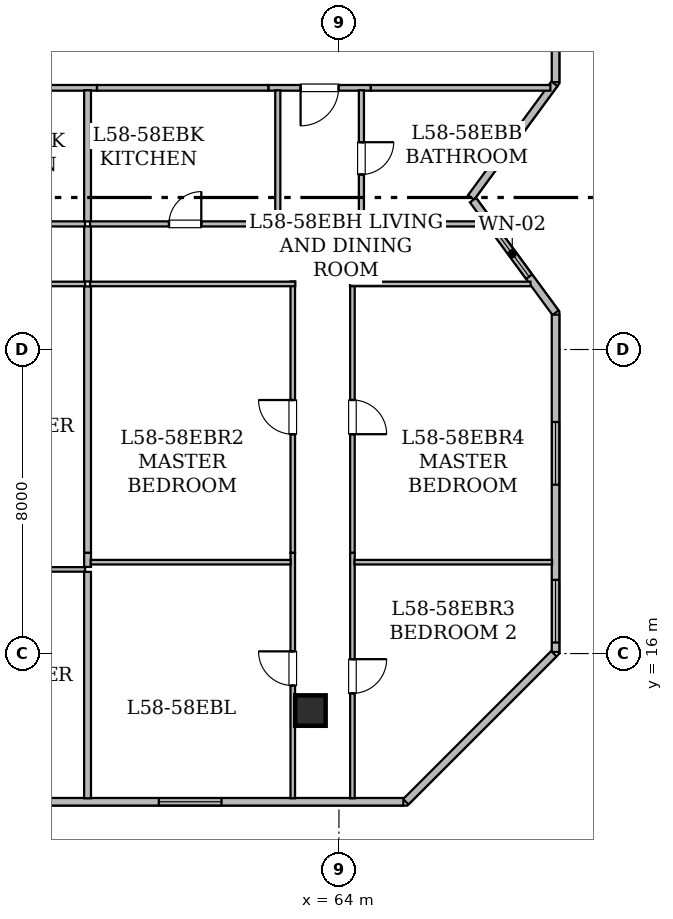
"""IFC4 building model, lengths in metres.
Left out: names, types, materials, properties, quantities, classifications, styles, units other than length and angle.
Written with IfcOpenShell. Run it as: python <this file> out.ifc"""

import sys

from ifc_helpers import new_model, si_unit, direction, frame, frame_2d, origin, origin_2d, place, context, subcontext, project, spatial, rectangle, hollow_rectangle, extrude, element, fill, save


model = new_model("IFC4")
c1 = context("Model", 3, precision=1e-05, world=origin(), true_north=direction((0.0, 1.0)))
c2 = subcontext(c1, "Body", "Model", "MODEL_VIEW")
j1 = project(units=[si_unit("LENGTHUNIT", "METRE"), si_unit("PLANEANGLEUNIT", "RADIAN")], contexts=[c1])
p1 = place(None, origin())
s1 = spatial("IfcSite", under=j1, at=p1, CompositionType="ELEMENT")
p2 = place(p1, origin())
s2 = spatial("IfcBuilding", under=s1, at=p2, CompositionType="ELEMENT")
p3 = place(p2, frame((0.0, 0.0, 228.15)))
s3 = spatial("IfcBuildingStorey", under=s2, at=p3, CompositionType="ELEMENT", Elevation=228.15)
for number, where, z_axis, x_axis in (
    (1, (63.25, 14.5, 0.0), (0.0, 0.0, 1.0), (1.0, 0.0, 0.0)),
    (2, (67.2, 21.425, 0.0), (0.0, 0.0, 1.0), (1.0, 0.0, 0.0)),
):
    element("IfcColumn", number, at=place(p3, frame(where, z_axis=z_axis, x_axis=x_axis)), inside=s3, PredefinedType="COLUMN", context=c2, shape_type="SweptSolid", body=[
        extrude(hollow_rectangle(XDim=0.8, YDim=0.8, WallThickness=0.04, at=origin_2d()), origin(), (0.0, 0.0, 1.0), 3.65),
    ])
p4 = place(p3, frame((69.7, 39.896, 0.0), z_axis=(0.0, 0.0, 1.0), x_axis=(0.0, -1.0, 0.0)))
e3 = element("IfcWall", 3, at=p4, inside=s3, PredefinedType="STANDARD", context=c2, shape_type="SweptSolid", body=[
    extrude(rectangle(XDim=8.863, YDim=0.2, at=frame_2d((4.432, 0.0))), origin(), (0.0, 0.0, 1.0), 3.43),
])
p5 = place(p4, frame((0.785, 0.0, 0.0)))
e4 = element("IfcOpeningElement", 4, at=p5, cuts=e3, PredefinedType="OPENING", context=c2, shape_type="SweptSolid", body=[
    extrude(rectangle(XDim=1.1, YDim=2.2, at=frame_2d((0.55, 1.1))), frame((0.0, 0.11, 0.0), z_axis=(0.0, -1.0, 0.0), x_axis=(1.0, 0.0, 0.0)), (0.0, 0.0, 1.0), 0.22),
])
p6 = place(p4, frame((4.641, 0.0, 0.85)))
e5 = element("IfcOpeningElement", 5, at=p6, cuts=e3, PredefinedType="OPENING", context=c2, shape_type="SweptSolid", body=[
    extrude(rectangle(XDim=1.65, YDim=1.55, at=frame_2d((0.825, 0.775))), frame((0.0, 0.11, 0.0), z_axis=(0.0, -1.0, 0.0), x_axis=(1.0, 0.0, 0.0)), (0.0, 0.0, 1.0), 0.22),
])
p7 = place(p4, frame((2.811, 0.0, 0.8)))
e6 = element("IfcOpeningElement", 6, at=p7, cuts=e3, PredefinedType="OPENING", context=c2, shape_type="SweptSolid", body=[
    extrude(rectangle(XDim=1.2, YDim=1.5, at=frame_2d((0.6, 0.75))), frame((0.0, 0.11, 0.0), z_axis=(0.0, -1.0, 0.0), x_axis=(1.0, 0.0, 0.0)), (0.0, 0.0, 1.0), 0.22),
])
p8 = place(p3, frame((69.67, 30.992, 0.0), z_axis=(0.0, 0.0, 1.0), x_axis=(-0.591320870733, -0.806436375566, 0.0)))
e7 = element("IfcWall", 7, at=p8, inside=s3, PredefinedType="STANDARD", context=c2, shape_type="SweptSolid", body=[
    extrude(rectangle(XDim=3.71, YDim=0.2, at=frame_2d((1.855, 0.0))), origin(), (0.0, 0.0, 1.0), 3.43),
])
p9 = place(p3, frame((67.527, 27.931, 0.0), z_axis=(0.0, 0.0, 1.0), x_axis=(0.591248456881, -0.80648946815, 0.0)))
e8 = element("IfcWall", 8, at=p9, inside=s3, PredefinedType="STANDARD", context=c2, shape_type="SweptSolid", body=[
    extrude(rectangle(XDim=3.675, YDim=0.2, at=frame_2d((1.837, 0.0))), origin(), (0.0, 0.0, 1.0), 3.43),
])
p10 = place(p9, frame((0.998, 0.0, 0.85)))
e9 = element("IfcOpeningElement", 9, at=p10, cuts=e8, PredefinedType="OPENING", context=c2, shape_type="SweptSolid", body=[
    extrude(rectangle(XDim=1.5, YDim=1.6, at=frame_2d((0.75, 0.8))), frame((0.0, 0.11, 0.0), z_axis=(0.0, -1.0, 0.0), x_axis=(1.0, 0.0, 0.0)), (0.0, 0.0, 1.0), 0.22),
])
p11 = place(p3, frame((69.7, 24.916, 0.0), z_axis=(0.0, 0.0, 1.0), x_axis=(0.0, -1.0, 0.0)))
e10 = element("IfcWall", 10, at=p11, inside=s3, PredefinedType="STANDARD", context=c2, shape_type="SweptSolid", body=[
    extrude(rectangle(XDim=8.875, YDim=0.2, at=frame_2d((4.438, 0.0))), origin(), (0.0, 0.0, 1.0), 3.43),
])
p12 = place(p11, frame((6.976, 0.0, 0.85)))
e11 = element("IfcOpeningElement", 11, at=p12, cuts=e10, PredefinedType="OPENING", context=c2, shape_type="SweptSolid", body=[
    extrude(rectangle(XDim=1.65, YDim=1.55, at=frame_2d((0.825, 0.775))), frame((0.0, 0.11, 0.0), z_axis=(0.0, -1.0, 0.0), x_axis=(1.0, 0.0, 0.0)), (0.0, 0.0, 1.0), 0.22),
])
p13 = place(p11, frame((2.823, 0.0, 0.85)))
e12 = element("IfcOpeningElement", 12, at=p13, cuts=e10, PredefinedType="OPENING", context=c2, shape_type="SweptSolid", body=[
    extrude(rectangle(XDim=1.65, YDim=1.55, at=frame_2d((0.825, 0.775))), frame((0.0, 0.11, 0.0), z_axis=(0.0, -1.0, 0.0), x_axis=(1.0, 0.0, 0.0)), (0.0, 0.0, 1.0), 0.22),
])
p14 = place(p3, frame((69.655, 15.996, 0.0), z_axis=(0.0, 0.0, 1.0), x_axis=(-0.707106781187, -0.707106781187, 0.0)))
e13 = element("IfcWall", 13, at=p14, inside=s3, PredefinedType="STANDARD", context=c2, shape_type="SweptSolid", body=[
    extrude(rectangle(XDim=5.51, YDim=0.2, at=frame_2d((2.755, 0.0))), origin(), (0.0, 0.0, 1.0), 3.43),
])
p15 = place(p3, frame((65.696, 12.1, 0.0), z_axis=(0.0, 0.0, 1.0), x_axis=(-1.0, 0.0, 0.0)))
e14 = element("IfcWall", 14, at=p15, inside=s3, PredefinedType="STANDARD", context=c2, shape_type="SweptSolid", body=[
    extrude(rectangle(XDim=41.393, YDim=0.2, at=frame_2d((20.697, 0.0))), origin(), (0.0, 0.0, 1.0), 3.43),
])
p16 = place(p15, frame((34.521, 0.0, 0.85)))
e15 = element("IfcOpeningElement", 15, at=p16, cuts=e14, PredefinedType="OPENING", context=c2, shape_type="SweptSolid", body=[
    extrude(rectangle(XDim=1.65, YDim=1.55, at=frame_2d((0.825, 0.775))), frame((0.0, 0.11, 0.0), z_axis=(0.0, -1.0, 0.0), x_axis=(1.0, 0.0, 0.0)), (0.0, 0.0, 1.0), 0.22),
])
p17 = place(p15, frame((39.14, 0.0, 0.85)))
e16 = element("IfcOpeningElement", 16, at=p17, cuts=e14, PredefinedType="OPENING", context=c2, shape_type="SweptSolid", body=[
    extrude(rectangle(XDim=1.65, YDim=1.55, at=frame_2d((0.825, 0.775))), frame((0.0, 0.11, 0.0), z_axis=(0.0, -1.0, 0.0), x_axis=(1.0, 0.0, 0.0)), (0.0, 0.0, 1.0), 0.22),
])
p18 = place(p15, frame((15.596, 0.0, 0.8)))
e17 = element("IfcOpeningElement", 17, at=p18, cuts=e14, PredefinedType="OPENING", context=c2, shape_type="SweptSolid", body=[
    extrude(rectangle(XDim=1.2, YDim=1.5, at=frame_2d((0.6, 0.75))), frame((0.0, 0.11, 0.0), z_axis=(0.0, -1.0, 0.0), x_axis=(1.0, 0.0, 0.0)), (0.0, 0.0, 1.0), 0.22),
])
p19 = place(p15, frame((19.706, 0.0, 0.85)))
e18 = element("IfcOpeningElement", 18, at=p19, cuts=e14, PredefinedType="OPENING", context=c2, shape_type="SweptSolid", body=[
    extrude(rectangle(XDim=1.65, YDim=1.55, at=frame_2d((0.825, 0.775))), frame((0.0, 0.11, 0.0), z_axis=(0.0, -1.0, 0.0), x_axis=(1.0, 0.0, 0.0)), (0.0, 0.0, 1.0), 0.22),
])
p20 = place(p15, frame((11.036, 0.0, 0.85)))
e19 = element("IfcOpeningElement", 19, at=p20, cuts=e14, PredefinedType="OPENING", context=c2, shape_type="SweptSolid", body=[
    extrude(rectangle(XDim=1.65, YDim=1.55, at=frame_2d((0.825, 0.775))), frame((0.0, 0.11, 0.0), z_axis=(0.0, -1.0, 0.0), x_axis=(1.0, 0.0, 0.0)), (0.0, 0.0, 1.0), 0.22),
])
p21 = place(p15, frame((4.786, 0.0, 0.85)))
e20 = element("IfcOpeningElement", 20, at=p21, cuts=e14, PredefinedType="OPENING", context=c2, shape_type="SweptSolid", body=[
    extrude(rectangle(XDim=1.65, YDim=1.55, at=frame_2d((0.825, 0.775))), frame((0.0, 0.11, 0.0), z_axis=(0.0, -1.0, 0.0), x_axis=(1.0, 0.0, 0.0)), (0.0, 0.0, 1.0), 0.22),
])
p22 = place(p3, frame((57.634, 30.885, 0.0), z_axis=(0.0, 0.0, 1.0), x_axis=(-1.0, 0.0, 0.0)))
e21 = element("IfcWall", 21, at=p22, inside=s3, PredefinedType="STANDARD", context=c2, shape_type="SweptSolid", body=[
    extrude(rectangle(XDim=7.935, YDim=0.15, at=frame_2d((3.968, 0.0))), origin(), (0.0, 0.0, 1.0), 2.725),
])
p23 = place(p3, frame((64.84, 30.885, 0.0), z_axis=(0.0, 0.0, 1.0), x_axis=(-1.0, 0.0, 0.0)))
e22 = element("IfcWall", 22, at=p23, inside=s3, PredefinedType="STANDARD", context=c2, shape_type="SweptSolid", body=[
    extrude(rectangle(XDim=2.698, YDim=0.15, at=frame_2d((1.349, 0.0))), origin(), (0.0, 0.0, 1.0), 3.43),
])
p24 = place(p23, frame((0.849, 0.0, 0.0)))
e23 = element("IfcOpeningElement", 23, at=p24, cuts=e22, PredefinedType="OPENING", context=c2, shape_type="SweptSolid", body=[
    extrude(rectangle(XDim=1.0, YDim=2.15, at=frame_2d((0.5, 1.075))), frame((0.0, 0.085, 0.0), z_axis=(0.0, -1.0, 0.0), x_axis=(1.0, 0.0, 0.0)), (0.0, 0.0, 1.0), 0.17),
])
p25 = place(p3, frame((69.564, 30.885, 0.0), z_axis=(0.0, 0.0, 1.0), x_axis=(-1.0, 0.0, 0.0)))
e24 = element("IfcWall", 24, at=p25, inside=s3, PredefinedType="STANDARD", context=c2, shape_type="SweptSolid", body=[
    extrude(rectangle(XDim=4.724, YDim=0.15, at=frame_2d((2.362, 0.0))), origin(), (0.0, 0.0, 1.0), 2.887),
])
p26 = place(p3, frame((62.142, 30.885, 0.0), z_axis=(0.0, 0.0, 1.0), x_axis=(-1.0, 0.0, 0.0)))
e25 = element("IfcWall", 25, at=p26, inside=s3, PredefinedType="STANDARD", context=c2, shape_type="SweptSolid", body=[
    extrude(rectangle(XDim=4.508, YDim=0.15, at=frame_2d((2.254, 0.0))), origin(), (0.0, 0.0, 1.0), 3.43),
])
p27 = place(p3, frame((49.385, 27.305, 0.0), z_axis=(0.0, 0.0, 1.0), x_axis=(1.0, 0.0, 0.0)))
e26 = element("IfcWall", 26, at=p27, inside=s3, PredefinedType="PARTITIONING", context=c2, shape_type="SweptSolid", body=[
    extrude(rectangle(XDim=7.935, YDim=0.135, at=frame_2d((3.968, 0.0))), origin(), (0.0, 0.0, 1.0), 2.725),
])
p28 = place(p27, frame((3.542, 0.0, 0.0)))
e27 = element("IfcOpeningElement", 27, at=p28, cuts=e26, PredefinedType="OPENING", context=c2, shape_type="SweptSolid", body=[
    extrude(rectangle(XDim=0.85, YDim=2.1, at=frame_2d((0.425, 1.05))), frame((0.0, 0.077, 0.0), z_axis=(0.0, -1.0, 0.0), x_axis=(1.0, 0.0, 0.0)), (0.0, 0.0, 1.0), 0.155),
])
p29 = place(p3, frame((57.32, 25.725, 0.0), z_axis=(0.0, 0.0, 1.0), x_axis=(-1.0, 0.0, 0.0)))
e28 = element("IfcWall", 28, at=p29, inside=s3, PredefinedType="PARTITIONING", context=c2, shape_type="SweptSolid", body=[
    extrude(rectangle(XDim=7.1, YDim=0.12, at=frame_2d((3.55, 0.0))), origin(), (0.0, 0.0, 1.0), 2.725),
])
p30 = place(p3, frame((57.385, 27.24, 0.0), z_axis=(0.0, 0.0, 1.0), x_axis=(0.0, -1.0, 0.0)))
e29 = element("IfcWall", 29, at=p30, inside=s3, PredefinedType="STANDARD", context=c2, shape_type="SweptSolid", body=[
    extrude(rectangle(XDim=1.45, YDim=0.18, at=frame_2d((0.725, 0.0))), origin(), (0.0, 0.0, 1.0), 3.43),
])
p31 = place(p3, frame((57.385, 30.82, 0.0), z_axis=(0.0, 0.0, 1.0), x_axis=(0.0, -1.0, 0.0)))
e30 = element("IfcWall", 30, at=p31, inside=s3, PredefinedType="STANDARD", context=c2, shape_type="SweptSolid", body=[
    extrude(rectangle(XDim=3.45, YDim=0.18, at=frame_2d((1.725, 0.0))), origin(), (0.0, 0.0, 1.0), 3.43),
])
p32 = place(p3, frame((50.339, 18.214, 0.0), z_axis=(0.0, 0.0, 1.0), x_axis=(1.0, 0.0, 0.0)))
e31 = element("IfcWall", 31, at=p32, inside=s3, PredefinedType="PARTITIONING", context=c2, shape_type="SweptSolid", body=[
    extrude(rectangle(XDim=6.981, YDim=0.12, at=frame_2d((3.49, 0.0))), origin(), (0.0, 0.0, 1.0), 2.725),
])
p33 = place(p3, frame((57.385, 18.149, 0.0), z_axis=(0.0, 0.0, 1.0), x_axis=(0.0, -1.0, 0.0)))
e32 = element("IfcWall", 32, at=p33, inside=s3, PredefinedType="STANDARD", context=c2, shape_type="SweptSolid", body=[
    extrude(rectangle(XDim=5.957, YDim=0.18, at=frame_2d((2.979, 0.0))), origin(), (0.0, 0.0, 1.0), 2.725),
])
p34 = place(p3, frame((57.385, 18.653, 0.0), z_axis=(0.0, 0.0, 1.0), x_axis=(0.0, -1.0, 0.0)))
e33 = element("IfcWall", 33, at=p34, inside=s3, PredefinedType="STANDARD", context=c2, shape_type="SweptSolid", body=[
    extrude(rectangle(XDim=0.374, YDim=0.18, at=frame_2d((0.187, 0.0))), origin(), (0.0, 0.0, 1.0), 2.725),
])
p35 = place(p3, frame((57.385, 25.66, 0.0), z_axis=(0.0, 0.0, 1.0), x_axis=(0.0, -1.0, 0.0)))
e34 = element("IfcWall", 34, at=p35, inside=s3, PredefinedType="STANDARD", context=c2, shape_type="SweptSolid", body=[
    extrude(rectangle(XDim=7.007, YDim=0.18, at=frame_2d((3.503, 0.0))), origin(), (0.0, 0.0, 1.0), 2.725),
])
p36 = place(p3, frame((64.591, 30.82, 0.0), z_axis=(0.0, 0.0, 1.0), x_axis=(0.0, -1.0, 0.0)))
e35 = element("IfcWall", 35, at=p36, inside=s3, PredefinedType="PARTITIONING", context=c2, shape_type="SweptSolid", body=[
    extrude(rectangle(XDim=3.58, YDim=0.135, at=frame_2d((1.79, 0.0))), origin(), (0.0, 0.0, 1.0), 3.43),
])
p37 = place(p36, frame((1.365, 0.0, 0.0)))
e36 = element("IfcOpeningElement", 36, at=p37, cuts=e35, PredefinedType="OPENING", context=c2, shape_type="SweptSolid", body=[
    extrude(rectangle(XDim=0.85, YDim=2.1, at=frame_2d((0.425, 1.05))), frame((0.0, 0.077, 0.0), z_axis=(0.0, -1.0, 0.0), x_axis=(1.0, 0.0, 0.0)), (0.0, 0.0, 1.0), 0.155),
])
p38 = place(p3, frame((64.526, 27.305, 0.0), z_axis=(0.0, 0.0, 1.0), x_axis=(1.0, 0.0, 0.0)))
e37 = element("IfcWall", 37, at=p38, inside=s3, PredefinedType="PARTITIONING", context=c2, shape_type="SweptSolid", body=[
    extrude(rectangle(XDim=3.431, YDim=0.135, at=frame_2d((1.716, 0.0))), origin(), (0.0, 0.0, 1.0), 2.887),
])
p39 = place(p3, frame((57.45, 27.305, 0.0), z_axis=(0.0, 0.0, 1.0), x_axis=(1.0, 0.0, 0.0)))
e38 = element("IfcWall", 38, at=p39, inside=s3, PredefinedType="PARTITIONING", context=c2, shape_type="SweptSolid", body=[
    extrude(rectangle(XDim=5.006, YDim=0.135, at=frame_2d((2.503, 0.0))), origin(), (0.0, 0.0, 1.0), 3.43),
])
p40 = place(p39, frame((2.078, 0.0, 0.0)))
e39 = element("IfcOpeningElement", 39, at=p40, cuts=e38, PredefinedType="OPENING", context=c2, shape_type="SweptSolid", body=[
    extrude(rectangle(XDim=0.85, YDim=2.1, at=frame_2d((0.425, 1.05))), frame((0.0, 0.077, 0.0), z_axis=(0.0, -1.0, 0.0), x_axis=(1.0, 0.0, 0.0)), (0.0, 0.0, 1.0), 0.155),
])
p41 = place(p3, frame((62.391, 27.24, 0.0), z_axis=(0.0, 0.0, 1.0), x_axis=(0.0, 1.0, 0.0)))
e40 = element("IfcWall", 40, at=p41, inside=s3, PredefinedType="PARTITIONING", context=c2, shape_type="SweptSolid", body=[
    extrude(rectangle(XDim=3.58, YDim=0.135, at=frame_2d((1.79, 0.0))), origin(), (0.0, 0.0, 1.0), 3.43),
])
p42 = place(p3, frame((62.785, 12.192, 0.0), z_axis=(0.0, 0.0, 1.0), x_axis=(0.0, 1.0, 0.0)))
e41 = element("IfcWall", 41, at=p42, inside=s3, PredefinedType="PARTITIONING", context=c2, shape_type="SweptSolid", body=[
    extrude(rectangle(XDim=6.461, YDim=0.12, at=frame_2d((3.23, 0.0))), origin(), (0.0, 0.0, 1.0), 2.725),
])
p43 = place(p42, frame((2.966, 0.0, 0.0)))
e42 = element("IfcOpeningElement", 42, at=p43, cuts=e41, PredefinedType="OPENING", context=c2, shape_type="SweptSolid", body=[
    extrude(rectangle(XDim=0.9, YDim=2.1, at=frame_2d((0.45, 1.05))), frame((0.0, 0.07, 0.0), z_axis=(0.0, -1.0, 0.0), x_axis=(1.0, 0.0, 0.0)), (0.0, 0.0, 1.0), 0.14),
])
p44 = place(p3, frame((62.785, 18.653, 0.0), z_axis=(0.0, 0.0, 1.0), x_axis=(0.0, 1.0, 0.0)))
e43 = element("IfcWall", 43, at=p44, inside=s3, PredefinedType="PARTITIONING", context=c2, shape_type="SweptSolid", body=[
    extrude(rectangle(XDim=7.137, YDim=0.12, at=frame_2d((3.568, 0.0))), origin(), (0.0, 0.0, 1.0), 2.725),
])
p45 = place(p44, frame((3.118, 0.0, 0.0)))
e44 = element("IfcOpeningElement", 44, at=p45, cuts=e43, PredefinedType="OPENING", context=c2, shape_type="SweptSolid", body=[
    extrude(rectangle(XDim=0.9, YDim=2.1, at=frame_2d((0.45, 1.05))), frame((0.0, 0.07, 0.0), z_axis=(0.0, -1.0, 0.0), x_axis=(1.0, 0.0, 0.0)), (0.0, 0.0, 1.0), 0.14),
])
p46 = place(p3, frame((62.85, 25.725, 0.0), z_axis=(0.0, 0.0, 1.0), x_axis=(-1.0, 0.0, 0.0)))
e45 = element("IfcWall", 45, at=p46, inside=s3, PredefinedType="PARTITIONING", context=c2, shape_type="SweptSolid", body=[
    extrude(rectangle(XDim=5.4, YDim=0.12, at=frame_2d((2.7, 0.0))), origin(), (0.0, 0.0, 1.0), 3.43),
])
p47 = place(p3, frame((64.355, 18.653, 0.0), z_axis=(0.0, 0.0, 1.0), x_axis=(0.0, -1.0, 0.0)))
e46 = element("IfcWall", 46, at=p47, inside=s3, PredefinedType="PARTITIONING", context=c2, shape_type="SweptSolid", body=[
    extrude(rectangle(XDim=6.461, YDim=0.12, at=frame_2d((3.23, 0.0))), origin(), (0.0, 0.0, 1.0), 2.887),
])
p48 = place(p47, frame((2.801, 0.0, 0.0)))
e47 = element("IfcOpeningElement", 47, at=p48, cuts=e46, PredefinedType="OPENING", context=c2, shape_type="SweptSolid", body=[
    extrude(rectangle(XDim=0.9, YDim=2.1, at=frame_2d((0.45, 1.05))), frame((0.0, 0.07, 0.0), z_axis=(0.0, -1.0, 0.0), x_axis=(1.0, 0.0, 0.0)), (0.0, 0.0, 1.0), 0.14),
])
p49 = place(p3, frame((64.355, 25.79, 0.0), z_axis=(0.0, 0.0, 1.0), x_axis=(0.0, -1.0, 0.0)))
e48 = element("IfcWall", 48, at=p49, inside=s3, PredefinedType="PARTITIONING", context=c2, shape_type="SweptSolid", body=[
    extrude(rectangle(XDim=7.137, YDim=0.12, at=frame_2d((3.568, 0.0))), origin(), (0.0, 0.0, 1.0), 2.725),
])
p50 = place(p49, frame((3.118, 0.0, 0.0)))
e49 = element("IfcOpeningElement", 49, at=p50, cuts=e48, PredefinedType="OPENING", context=c2, shape_type="SweptSolid", body=[
    extrude(rectangle(XDim=0.9, YDim=2.1, at=frame_2d((0.45, 1.05))), frame((0.0, 0.07, 0.0), z_axis=(0.0, -1.0, 0.0), x_axis=(1.0, 0.0, 0.0)), (0.0, 0.0, 1.0), 0.14),
])
p51 = place(p3, frame((69.041, 25.725, 0.0), z_axis=(0.0, 0.0, 1.0), x_axis=(-1.0, 0.0, 0.0)))
e50 = element("IfcWall", 50, at=p51, inside=s3, PredefinedType="PARTITIONING", context=c2, shape_type="SweptSolid", body=[
    extrude(rectangle(XDim=4.751, YDim=0.12, at=frame_2d((2.375, 0.0))), origin(), (0.0, 0.0, 1.0), 2.887),
])
p52 = place(p3, frame((57.467, 18.404, 0.0), z_axis=(0.0, 0.0, 1.0), x_axis=(1.0, 0.0, 0.0)))
e51 = element("IfcWall", 51, at=p52, inside=s3, PredefinedType="PARTITIONING", context=c2, shape_type="SweptSolid", body=[
    extrude(rectangle(XDim=5.264, YDim=0.12, at=frame_2d((2.632, 0.0))), origin(), (0.0, 0.0, 1.0), 3.43),
])
p53 = place(p3, frame((64.409, 18.404, 0.0), z_axis=(0.0, 0.0, 1.0), x_axis=(1.0, 0.0, 0.0)))
e52 = element("IfcWall", 52, at=p53, inside=s3, PredefinedType="PARTITIONING", context=c2, shape_type="SweptSolid", body=[
    extrude(rectangle(XDim=5.199, YDim=0.12, at=frame_2d((2.6, 0.0))), origin(), (0.0, 0.0, 1.0), 2.887),
])
p54 = place(p10, origin())
e53 = element("IfcWindow", 53, at=p54, inside=s3, PartitioningType="SINGLE_PANEL", PredefinedType="WINDOW", context=c2, shape_type="SweptSolid", body=[
    extrude(rectangle(XDim=1.5, YDim=1.6, at=frame_2d((0.75, 0.8))), frame((0.0, 0.03, 0.0), z_axis=(0.0, -1.0, 0.0), x_axis=(1.0, 0.0, 0.0)), (0.0, 0.0, 1.0), 0.06),
])
fill(e9, e53)
p55 = place(p21, origin())
e54 = element("IfcWindow", 54, at=p55, inside=s3, PartitioningType="SINGLE_PANEL", PredefinedType="WINDOW", context=c2, shape_type="SweptSolid", body=[
    extrude(rectangle(XDim=1.65, YDim=1.55, at=frame_2d((0.825, 0.775))), frame((0.0, 0.03, 0.0), z_axis=(0.0, -1.0, 0.0), x_axis=(1.0, 0.0, 0.0)), (0.0, 0.0, 1.0), 0.06),
])
fill(e20, e54)
p56 = place(p12, origin())
e55 = element("IfcWindow", 55, at=p56, inside=s3, PartitioningType="SINGLE_PANEL", PredefinedType="WINDOW", context=c2, shape_type="SweptSolid", body=[
    extrude(rectangle(XDim=1.65, YDim=1.55, at=frame_2d((0.825, 0.775))), frame((0.0, 0.03, 0.0), z_axis=(0.0, -1.0, 0.0), x_axis=(1.0, 0.0, 0.0)), (0.0, 0.0, 1.0), 0.06),
])
fill(e11, e55)
p57 = place(p13, origin())
e56 = element("IfcWindow", 56, at=p57, inside=s3, PartitioningType="SINGLE_PANEL", PredefinedType="WINDOW", context=c2, shape_type="SweptSolid", body=[
    extrude(rectangle(XDim=1.65, YDim=1.55, at=frame_2d((0.825, 0.775))), frame((0.0, 0.03, 0.0), z_axis=(0.0, -1.0, 0.0), x_axis=(1.0, 0.0, 0.0)), (0.0, 0.0, 1.0), 0.06),
])
fill(e12, e56)
p58 = place(p24, origin())
e57 = element("IfcDoor", 57, at=p58, inside=s3, OperationType="SINGLE_SWING_RIGHT", PredefinedType="DOOR", context=c2, shape_type="SweptSolid", body=[
    extrude(rectangle(XDim=1.0, YDim=2.15, at=frame_2d((0.5, 1.075))), frame((0.0, 0.025, 0.0), z_axis=(0.0, -1.0, 0.0), x_axis=(1.0, 0.0, 0.0)), (0.0, 0.0, 1.0), 0.05),
])
fill(e23, e57)
p59 = place(p37, origin())
e58 = element("IfcDoor", 58, at=p59, inside=s3, OperationType="SINGLE_SWING_LEFT", PredefinedType="DOOR", context=c2, shape_type="SweptSolid", body=[
    extrude(rectangle(XDim=0.85, YDim=2.1, at=frame_2d((0.425, 1.05))), frame((0.0, 0.025, 0.0), z_axis=(0.0, -1.0, 0.0), x_axis=(1.0, 0.0, 0.0)), (0.0, 0.0, 1.0), 0.05),
])
fill(e36, e58)
p60 = place(p40, origin())
e59 = element("IfcDoor", 59, at=p60, inside=s3, OperationType="SINGLE_SWING_RIGHT", PredefinedType="DOOR", context=c2, shape_type="SweptSolid", body=[
    extrude(rectangle(XDim=0.85, YDim=2.1, at=frame_2d((0.425, 1.05))), frame((0.0, 0.025, 0.0), z_axis=(0.0, -1.0, 0.0), x_axis=(1.0, 0.0, 0.0)), (0.0, 0.0, 1.0), 0.05),
])
fill(e39, e59)
p61 = place(p43, origin())
e60 = element("IfcDoor", 60, at=p61, inside=s3, OperationType="SINGLE_SWING_RIGHT", PredefinedType="DOOR", context=c2, shape_type="SweptSolid", body=[
    extrude(rectangle(XDim=0.9, YDim=2.1, at=frame_2d((0.45, 1.05))), frame((0.0, 0.025, 0.0), z_axis=(0.0, -1.0, 0.0), x_axis=(1.0, 0.0, 0.0)), (0.0, 0.0, 1.0), 0.05),
])
fill(e42, e60)
p62 = place(p45, origin())
e61 = element("IfcDoor", 61, at=p62, inside=s3, OperationType="SINGLE_SWING_RIGHT", PredefinedType="DOOR", context=c2, shape_type="SweptSolid", body=[
    extrude(rectangle(XDim=0.9, YDim=2.1, at=frame_2d((0.45, 1.05))), frame((0.0, 0.025, 0.0), z_axis=(0.0, -1.0, 0.0), x_axis=(1.0, 0.0, 0.0)), (0.0, 0.0, 1.0), 0.05),
])
fill(e44, e61)
p63 = place(p48, origin())
e62 = element("IfcDoor", 62, at=p63, inside=s3, OperationType="SINGLE_SWING_LEFT", PredefinedType="DOOR", context=c2, shape_type="SweptSolid", body=[
    extrude(rectangle(XDim=0.9, YDim=2.1, at=frame_2d((0.45, 1.05))), frame((0.0, 0.025, 0.0), z_axis=(0.0, -1.0, 0.0), x_axis=(1.0, 0.0, 0.0)), (0.0, 0.0, 1.0), 0.05),
])
fill(e47, e62)
p64 = place(p50, origin())
e63 = element("IfcDoor", 63, at=p64, inside=s3, OperationType="SINGLE_SWING_RIGHT", PredefinedType="DOOR", context=c2, shape_type="SweptSolid", body=[
    extrude(rectangle(XDim=0.9, YDim=2.1, at=frame_2d((0.45, 1.05))), frame((0.0, 0.025, 0.0), z_axis=(0.0, -1.0, 0.0), x_axis=(1.0, 0.0, 0.0)), (0.0, 0.0, 1.0), 0.05),
])
fill(e49, e63)
save(model, sys.argv[1])
